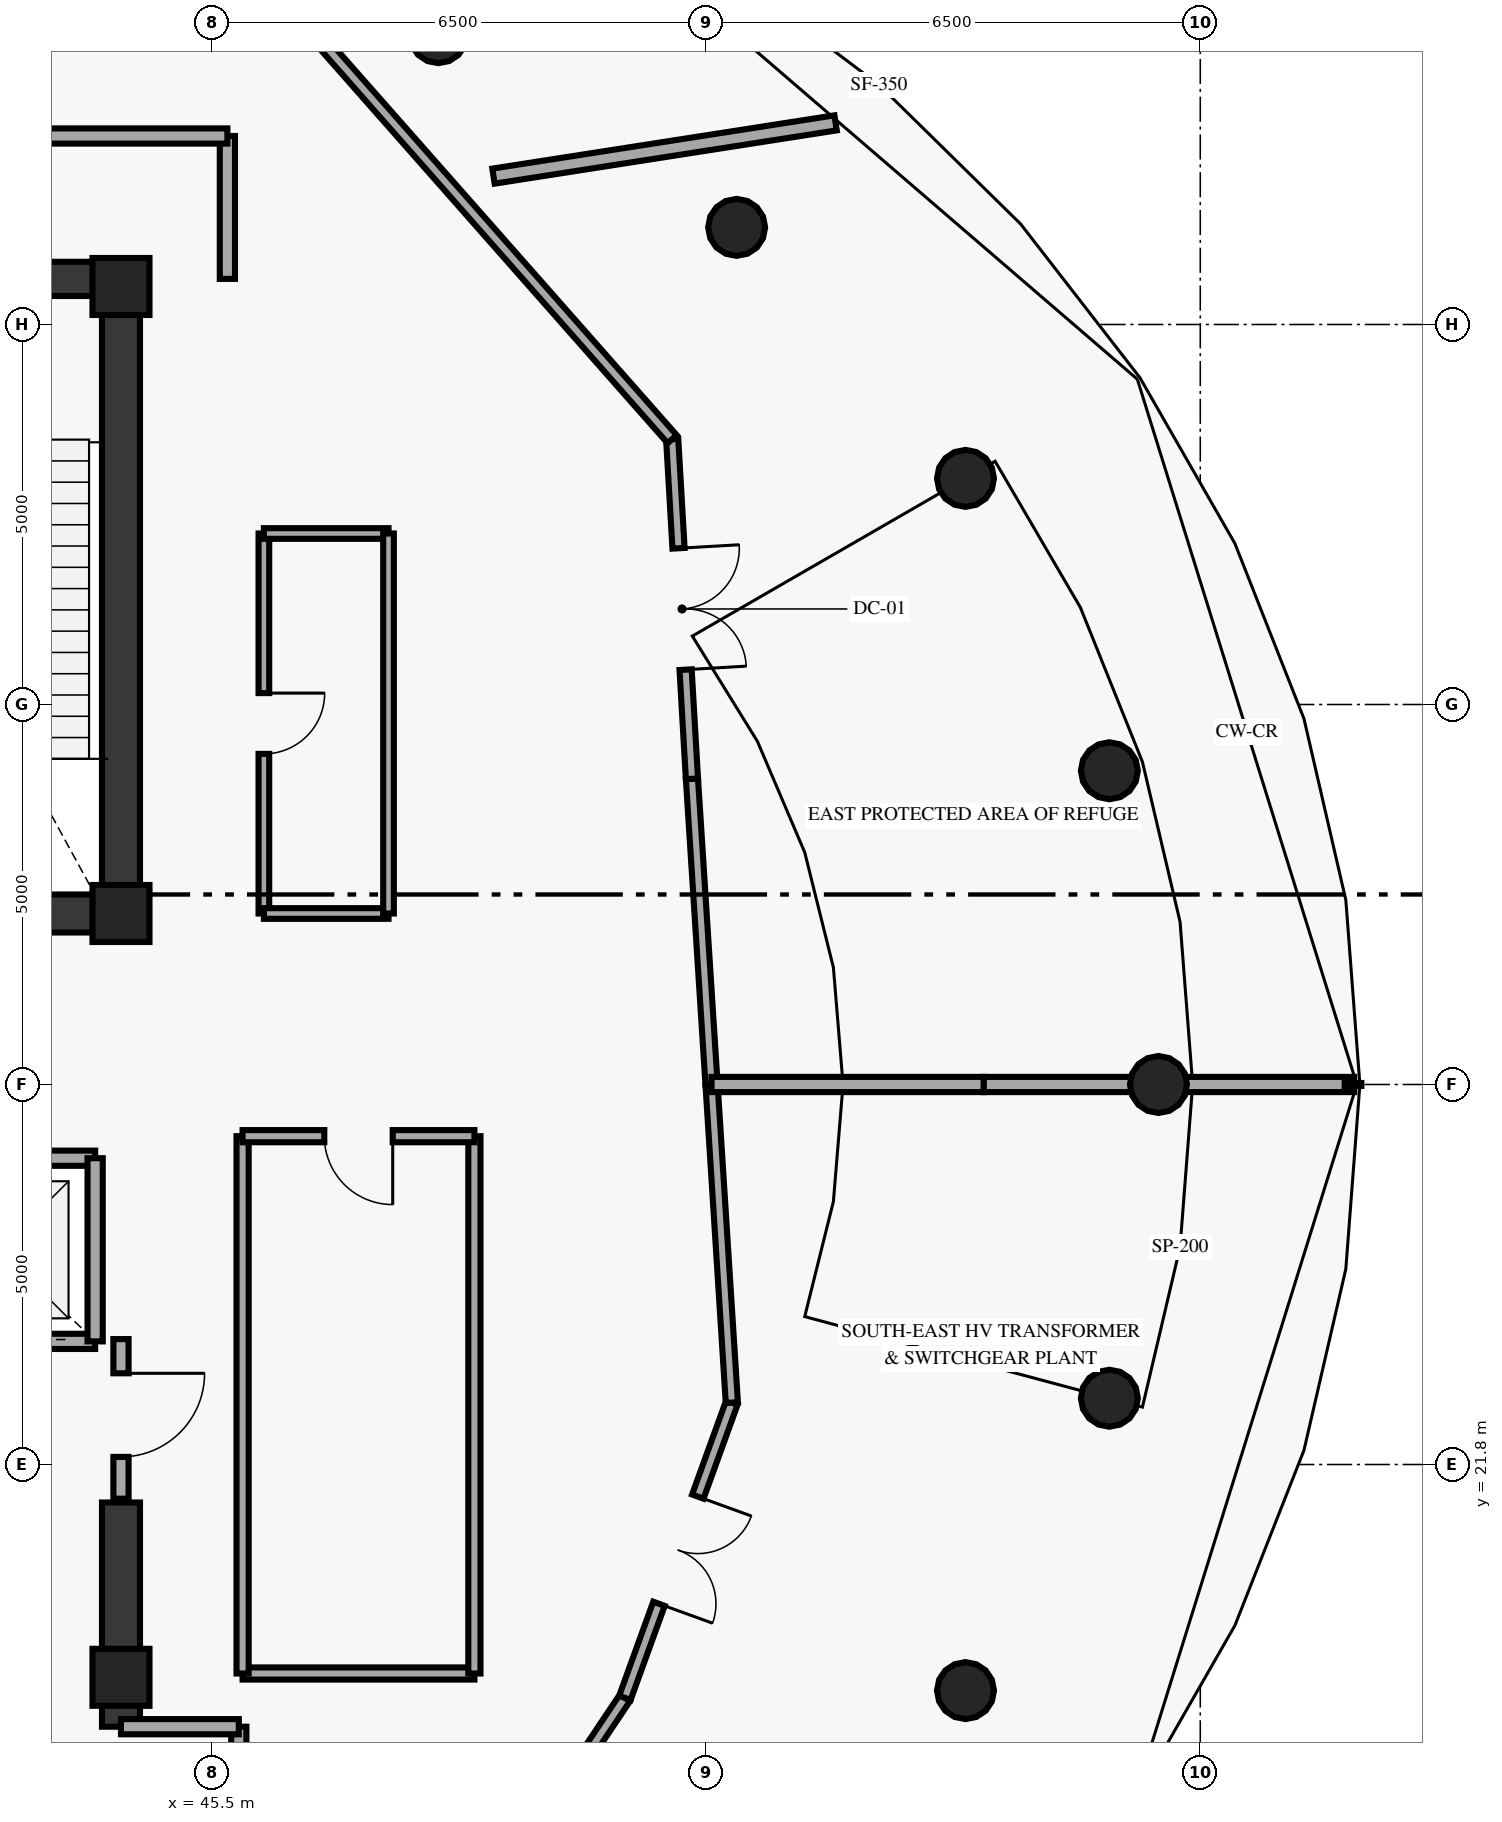
"""IFC4 building model, lengths in metres.
Left out: names, types, materials, properties, quantities, classifications, styles, units other than length and angle.
Written with IfcOpenShell. Run it as: python <this file> out.ifc"""

import sys

from ifc_helpers import new_model, si_unit, direction, frame, frame_2d, origin, origin_2d, place, context, subcontext, project, spatial, rectangle, circle, extrude, element, fill, save


model = new_model("IFC4")
c1 = context("Model", 3, precision=1e-05, world=origin(), true_north=direction((0.0, 1.0)))
c2 = subcontext(c1, "Body", "Model", "MODEL_VIEW")
j1 = project(units=[si_unit("LENGTHUNIT", "METRE"), si_unit("PLANEANGLEUNIT", "RADIAN")], contexts=[c1])
p1 = place(None, origin())
s1 = spatial("IfcSite", under=j1, at=p1, CompositionType="ELEMENT")
p2 = place(p1, origin())
s2 = spatial("IfcBuilding", under=s1, at=p2, CompositionType="ELEMENT")
p3 = place(p2, frame((0.0, 0.0, 301.2)))
s3 = spatial("IfcBuildingStorey", under=s2, at=p3, CompositionType="ELEMENT", Elevation=301.2)
for number, where, z_axis, x_axis in (
    (1, (44.3, 19.0, 0.0), (0.0, 0.0, 1.0), (1.0, 0.0, 0.0)),
    (2, (44.3, 29.05, 0.0), (0.0, 0.0, 1.0), (1.0, 0.0, 0.0)),
    (3, (44.3, 37.3, 0.0), (0.0, 0.0, 1.0), (1.0, 0.0, 0.0)),
):
    element("IfcColumn", number, at=place(p3, frame(where, z_axis=z_axis, x_axis=x_axis)), inside=s3, PredefinedType="PILASTER", context=c2, shape_type="SweptSolid", body=[
        extrude(rectangle(XDim=0.75, YDim=0.75, at=origin_2d()), origin(), (0.0, 0.0, 1.0), 5.25),
    ])
for number, where, z_axis, x_axis in (
    (4, (57.95, 26.8, 0.0), (0.0, 0.0, 1.0), (1.0, 0.0, 0.0)),
    (5, (57.304, 30.928, 0.0), (0.0, 0.0, 1.0), (1.0, 0.0, 0.0)),
    (6, (55.411, 34.775, 0.0), (0.0, 0.0, 1.0), (1.0, 0.0, 0.0)),
    (7, (52.4, 38.078, 0.0), (0.0, 0.0, 1.0), (1.0, 0.0, 0.0)),
    (8, (48.475, 40.613, 0.0), (0.0, 0.0, 1.0), (1.0, 0.0, 0.0)),
    (9, (55.411, 18.825, 0.0), (0.0, 0.0, 1.0), (1.0, 0.0, 0.0)),
    (10, (57.304, 22.672, 0.0), (0.0, 0.0, 1.0), (1.0, 0.0, 0.0)),
):
    element("IfcColumn", number, at=place(p3, frame(where, z_axis=z_axis, x_axis=x_axis)), inside=s3, PredefinedType="COLUMN", context=c2, shape_type="SweptSolid", body=[
        extrude(circle(Radius=0.375, at=origin_2d()), origin(), (0.0, 0.0, 1.0), 5.25),
    ])
p4 = place(p3, frame((44.3, 29.05, 0.0), z_axis=(0.0, 0.0, 1.0), x_axis=(0.0, 1.0, 0.0)))
e11 = element("IfcWall", 11, at=p4, inside=s3, PredefinedType="SHEAR", context=c2, shape_type="SweptSolid", body=[
    extrude(rectangle(XDim=8.35, YDim=0.5, at=frame_2d((4.175, 0.0))), origin(), (0.0, 0.0, 1.0), 5.25),
])
p5 = place(p3, frame((44.3, 18.35, 0.0), z_axis=(0.0, 0.0, 1.0), x_axis=(0.0, 1.0, 0.0)))
e12 = element("IfcWall", 12, at=p5, inside=s3, PredefinedType="SHEAR", context=c2, shape_type="SweptSolid", body=[
    extrude(rectangle(XDim=2.95, YDim=0.5, at=frame_2d((1.475, 0.0))), origin(), (0.0, 0.0, 1.0), 5.25),
])
p6 = place(p3, frame((33.7, 29.05, 0.0), z_axis=(0.0, 0.0, 1.0), x_axis=(1.0, 0.0, 0.0)))
e13 = element("IfcWall", 13, at=p6, inside=s3, PredefinedType="SHEAR", context=c2, shape_type="SweptSolid", body=[
    extrude(rectangle(XDim=10.6, YDim=0.5, at=frame_2d((5.3, 0.0))), origin(), (0.0, 0.0, 1.0), 5.25),
])
p7 = place(p3, frame((44.3, 37.4, 0.0), z_axis=(0.0, 0.0, 1.0), x_axis=(-1.0, 0.0, 0.0)))
e14 = element("IfcWall", 14, at=p7, inside=s3, PredefinedType="SHEAR", context=c2, shape_type="SweptSolid", body=[
    extrude(rectangle(XDim=3.65, YDim=0.45, at=frame_2d((1.825, 0.0))), origin(), (0.0, 0.0, 1.0), 5.25),
])
p8 = place(p7, frame((1.25, 0.0, 0.0)))
e15 = element("IfcOpeningElement", 15, at=p8, cuts=e14, PredefinedType="OPENING", context=c2, shape_type="SweptSolid", body=[
    extrude(rectangle(XDim=1.15, YDim=2.15, at=frame_2d((0.575, 1.075))), frame((0.0, 0.235, 0.0), z_axis=(0.0, -1.0, 0.0), x_axis=(1.0, 0.0, 0.0)), (0.0, 0.0, 1.0), 0.47),
])
p9 = place(p3, frame((45.7, 37.4, 0.0), z_axis=(0.0, 0.0, 1.0), x_axis=(0.0, 1.0, 0.0)))
e16 = element("IfcWall", 16, at=p9, inside=s3, PredefinedType="SOLIDWALL", context=c2, shape_type="SweptSolid", body=[
    extrude(rectangle(XDim=1.88, YDim=0.2, at=frame_2d((0.94, 0.0))), origin(), (0.0, 0.0, 1.0), 5.25),
])
p10 = place(p3, frame((45.7, 39.28, 0.0), z_axis=(0.0, 0.0, 1.0), x_axis=(-1.0, 0.0, 0.0)))
e17 = element("IfcWall", 17, at=p10, inside=s3, PredefinedType="SOLIDWALL", context=c2, shape_type="SweptSolid", body=[
    extrude(rectangle(XDim=6.6, YDim=0.2, at=frame_2d((3.3, 0.0))), origin(), (0.0, 0.0, 1.0), 5.25),
])
p11 = place(p10, frame((4.35, 0.0, 0.0)))
e18 = element("IfcOpeningElement", 18, at=p11, cuts=e17, PredefinedType="OPENING", context=c2, shape_type="SweptSolid", body=[
    extrude(rectangle(XDim=1.6, YDim=2.2, at=frame_2d((0.8, 1.1))), frame((0.0, 0.11, 0.0), z_axis=(0.0, -1.0, 0.0), x_axis=(1.0, 0.0, 0.0)), (0.0, 0.0, 1.0), 0.22),
])
p12 = place(p3, frame((41.46, 23.42, 0.0), z_axis=(0.0, 0.0, 1.0), x_axis=(1.0, 0.0, 0.0)))
e19 = element("IfcWall", 19, at=p12, inside=s3, PredefinedType="SOLIDWALL", context=c2, shape_type="SweptSolid", body=[
    extrude(rectangle(XDim=2.5, YDim=0.2, at=frame_2d((1.25, 0.0))), origin(), (0.0, 0.0, 1.0), 5.25),
])
p13 = place(p12, frame((0.7, 0.0, 0.0)))
e20 = element("IfcOpeningElement", 20, at=p13, cuts=e19, PredefinedType="OPENING", context=c2, shape_type="SweptSolid", body=[
    extrude(rectangle(XDim=1.1, YDim=2.15, at=frame_2d((0.55, 1.075))), frame((0.0, 0.11, 0.0), z_axis=(0.0, -1.0, 0.0), x_axis=(1.0, 0.0, 0.0)), (0.0, 0.0, 1.0), 0.22),
])
p14 = place(p3, frame((41.46, 25.83, 0.0), z_axis=(0.0, 0.0, 1.0), x_axis=(1.0, 0.0, 0.0)))
e21 = element("IfcWall", 21, at=p14, inside=s3, PredefinedType="SOLIDWALL", context=c2, shape_type="SweptSolid", body=[
    extrude(rectangle(XDim=2.5, YDim=0.2, at=frame_2d((1.25, 0.0))), origin(), (0.0, 0.0, 1.0), 5.25),
])
p15 = place(p3, frame((43.96, 23.42, 0.0), z_axis=(0.0, 0.0, 1.0), x_axis=(0.0, 1.0, 0.0)))
e22 = element("IfcWall", 22, at=p15, inside=s3, PredefinedType="SOLIDWALL", context=c2, shape_type="SweptSolid", body=[
    extrude(rectangle(XDim=2.41, YDim=0.2, at=frame_2d((1.205, 0.0))), origin(), (0.0, 0.0, 1.0), 5.25),
])
p16 = place(p3, frame((45.9, 19.05, 0.0), z_axis=(0.0, 0.0, 1.0), x_axis=(1.0, 0.0, 0.0)))
e23 = element("IfcWall", 23, at=p16, inside=s3, PredefinedType="PARTITIONING", context=c2, shape_type="SweptSolid", body=[
    extrude(rectangle(XDim=3.05, YDim=0.16, at=frame_2d((1.525, 0.0))), origin(), (0.0, 0.0, 1.0), 5.25),
])
for number, where, z_axis, x_axis in (
    (24, (48.95, 19.05, 0.0), (0.0, 0.0, 1.0), (0.0, 1.0, 0.0)),
    (25, (45.9, 19.05, 0.0), (0.0, 0.0, 1.0), (0.0, 1.0, 0.0)),
):
    element("IfcWall", number, at=place(p3, frame(where, z_axis=z_axis, x_axis=x_axis)), inside=s3, PredefinedType="PARTITIONING", context=c2, shape_type="SweptSolid", body=[
        extrude(rectangle(XDim=7.07, YDim=0.16, at=frame_2d((3.535, 0.0))), origin(), (0.0, 0.0, 1.0), 5.25),
    ])
p17 = place(p3, frame((48.95, 26.12, 0.0), z_axis=(0.0, 0.0, 1.0), x_axis=(-1.0, 0.0, 0.0)))
e26 = element("IfcWall", 26, at=p17, inside=s3, PredefinedType="PARTITIONING", context=c2, shape_type="SweptSolid", body=[
    extrude(rectangle(XDim=3.05, YDim=0.16, at=frame_2d((1.525, 0.0))), origin(), (0.0, 0.0, 1.0), 5.25),
])
p18 = place(p17, frame((1.075, 0.0, 0.0)))
e27 = element("IfcOpeningElement", 27, at=p18, cuts=e26, PredefinedType="OPENING", context=c2, shape_type="SweptSolid", body=[
    extrude(rectangle(XDim=0.9, YDim=2.1, at=frame_2d((0.45, 1.05))), frame((0.0, 0.09, 0.0), z_axis=(0.0, -1.0, 0.0), x_axis=(1.0, 0.0, 0.0)), (0.0, 0.0, 1.0), 0.18),
])
p19 = place(p3, frame((44.3, 21.35, 0.0), z_axis=(0.0, 0.0, 1.0), x_axis=(0.0, 1.0, 0.0)))
e28 = element("IfcWall", 28, at=p19, inside=s3, PredefinedType="SOLIDWALL", context=c2, shape_type="SweptSolid", body=[
    extrude(rectangle(XDim=2.1, YDim=0.2, at=frame_2d((1.05, 0.0))), origin(), (0.0, 0.0, 1.0), 4.635),
])
p20 = place(p19, frame((0.55, 0.0, 0.0)))
e29 = element("IfcOpeningElement", 29, at=p20, cuts=e28, PredefinedType="OPENING", context=c2, shape_type="SweptSolid", body=[
    extrude(rectangle(XDim=1.1, YDim=2.15, at=frame_2d((0.55, 1.075))), frame((0.0, 0.11, 0.0), z_axis=(0.0, -1.0, 0.0), x_axis=(1.0, 0.0, 0.0)), (0.0, 0.0, 1.0), 0.22),
])
p21 = place(p3, frame((45.85, 16.05, 0.0), z_axis=(0.0, 0.0, 1.0), x_axis=(0.0, 1.0, 0.0)))
e30 = element("IfcWall", 30, at=p21, inside=s3, PredefinedType="SOLIDWALL", context=c2, shape_type="SweptSolid", body=[
    extrude(rectangle(XDim=2.3, YDim=0.2, at=frame_2d((1.15, 0.0))), origin(), (0.0, 0.0, 1.0), 5.25),
])
p22 = place(p3, frame((44.3, 18.35, 0.0), z_axis=(0.0, 0.0, 1.0), x_axis=(1.0, 0.0, 0.0)))
e31 = element("IfcWall", 31, at=p22, inside=s3, PredefinedType="SOLIDWALL", context=c2, shape_type="SweptSolid", body=[
    extrude(rectangle(XDim=1.55, YDim=0.2, at=frame_2d((0.775, 0.0))), origin(), (0.0, 0.0, 1.0), 5.25),
])
p23 = place(p3, frame((46.18, 34.05, 0.0), z_axis=(0.0, 0.0, 1.0), x_axis=(0.0, -1.0, 0.0)))
e32 = element("IfcWall", 32, at=p23, inside=s3, PredefinedType="PARTITIONING", context=c2, shape_type="SweptSolid", body=[
    extrude(rectangle(XDim=5.0, YDim=0.14, at=frame_2d((2.5, 0.0))), origin(), (0.0, 0.0, 1.0), 5.25),
])
p24 = place(p23, frame((2.1, 0.0, 0.0)))
e33 = element("IfcOpeningElement", 33, at=p24, cuts=e32, PredefinedType="OPENING", context=c2, shape_type="SweptSolid", body=[
    extrude(rectangle(XDim=0.8, YDim=2.05, at=frame_2d((0.4, 1.025))), frame((0.0, 0.08, 0.0), z_axis=(0.0, -1.0, 0.0), x_axis=(1.0, 0.0, 0.0)), (0.0, 0.0, 1.0), 0.16),
])
for number, where, z_axis, x_axis in (
    (34, (46.18, 29.05, 0.0), (0.0, 0.0, 1.0), (1.0, 0.0, 0.0)),
    (35, (46.18, 34.05, 0.0), (0.0, 0.0, 1.0), (1.0, 0.0, 0.0)),
):
    element("IfcWall", number, at=place(p3, frame(where, z_axis=z_axis, x_axis=x_axis)), inside=s3, PredefinedType="PARTITIONING", context=c2, shape_type="SweptSolid", body=[
        extrude(rectangle(XDim=1.64, YDim=0.14, at=frame_2d((0.82, 0.0))), origin(), (0.0, 0.0, 1.0), 5.25),
    ])
p25 = place(p3, frame((47.82, 29.05, 0.0), z_axis=(0.0, 0.0, 1.0), x_axis=(0.0, 1.0, 0.0)))
e36 = element("IfcWall", 36, at=p25, inside=s3, PredefinedType="PARTITIONING", context=c2, shape_type="SweptSolid", body=[
    extrude(rectangle(XDim=5.0, YDim=0.14, at=frame_2d((2.5, 0.0))), origin(), (0.0, 0.0, 1.0), 5.25),
])
p26 = place(p3, frame((52.07, 26.8, 0.0), z_axis=(0.0, 0.0, 1.0), x_axis=(-0.064030047677, 0.997947971086, 0.0)))
e37 = element("IfcWall", 37, at=p26, inside=s3, PredefinedType="PARTITIONING", context=c2, shape_type="SweptSolid", body=[
    extrude(rectangle(XDim=4.03, YDim=0.16, at=frame_2d((2.015, 0.0))), origin(), (0.0, 0.0, 1.0), 5.25),
])
p27 = place(p3, frame((51.552, 35.291, 0.0), z_axis=(0.0, 0.0, 1.0), x_axis=(0.058082602913, -0.998311780577, 0.0)))
e38 = element("IfcWall", 38, at=p27, inside=s3, PredefinedType="PARTITIONING", context=c2, shape_type="SweptSolid", body=[
    extrude(rectangle(XDim=4.477, YDim=0.16, at=frame_2d((2.238, 0.0))), origin(), (0.0, 0.0, 1.0), 5.25),
])
p28 = place(p27, frame((1.438, 0.0, 0.0)))
e39 = element("IfcOpeningElement", 39, at=p28, cuts=e38, PredefinedType="OPENING", context=c2, shape_type="SweptSolid", body=[
    extrude(rectangle(XDim=1.6, YDim=2.2, at=frame_2d((0.8, 1.1))), frame((0.0, 0.09, 0.0), z_axis=(0.0, -1.0, 0.0), x_axis=(1.0, 0.0, 0.0)), (0.0, 0.0, 1.0), 0.18),
])
p29 = place(p3, frame((51.552, 35.291, 0.0), z_axis=(0.0, 0.0, 1.0), x_axis=(-0.661421630005, 0.750014284772, 0.0)))
e40 = element("IfcWall", 40, at=p29, inside=s3, PredefinedType="PARTITIONING", context=c2, shape_type="SweptSolid", body=[
    extrude(rectangle(XDim=8.116, YDim=0.16, at=frame_2d((4.058, 0.0))), origin(), (0.0, 0.0, 1.0), 5.25),
])
p30 = place(p3, frame((48.714, 15.418, 0.0), z_axis=(0.0, 0.0, 1.0), x_axis=(0.556056751682, 0.831144324958, 0.0)))
e41 = element("IfcWall", 41, at=p30, inside=s3, PredefinedType="PARTITIONING", context=c2, shape_type="SweptSolid", body=[
    extrude(rectangle(XDim=3.985, YDim=0.16, at=frame_2d((1.992, 0.0))), origin(), (0.0, 0.0, 1.0), 5.25),
])
p31 = place(p3, frame((52.337, 22.614, 0.0), z_axis=(0.0, 0.0, 1.0), x_axis=(-0.34058972089, -0.940212019719, 0.0)))
e42 = element("IfcWall", 42, at=p31, inside=s3, PredefinedType="PARTITIONING", context=c2, shape_type="SweptSolid", body=[
    extrude(rectangle(XDim=4.131, YDim=0.16, at=frame_2d((2.065, 0.0))), origin(), (0.0, 0.0, 1.0), 5.25),
])
p32 = place(p31, frame((1.315, 0.0, 0.0)))
e43 = element("IfcOpeningElement", 43, at=p32, cuts=e42, PredefinedType="OPENING", context=c2, shape_type="SweptSolid", body=[
    extrude(rectangle(XDim=1.5, YDim=2.2, at=frame_2d((0.75, 1.1))), frame((0.0, 0.09, 0.0), z_axis=(0.0, -1.0, 0.0), x_axis=(1.0, 0.0, 0.0)), (0.0, 0.0, 1.0), 0.18),
])
p33 = place(p3, frame((52.337, 22.614, 0.0), z_axis=(0.0, 0.0, 1.0), x_axis=(-0.063617518313, 0.997974354061, 0.0)))
e44 = element("IfcWall", 44, at=p33, inside=s3, PredefinedType="PARTITIONING", context=c2, shape_type="SweptSolid", body=[
    extrude(rectangle(XDim=4.195, YDim=0.16, at=frame_2d((2.097, 0.0))), origin(), (0.0, 0.0, 1.0), 5.25),
])
p34 = place(p3, frame((52.07, 26.8, 0.0), z_axis=(0.0, 0.0, 1.0), x_axis=(1.0, 0.0, 0.0)))
e45 = element("IfcWall", 45, at=p34, inside=s3, PredefinedType="SOLIDWALL", context=c2, shape_type="SweptSolid", body=[
    extrude(rectangle(XDim=3.582, YDim=0.2, at=frame_2d((1.791, 0.0))), origin(), (0.0, 0.0, 1.0), 5.25),
])
p35 = place(p3, frame((55.652, 26.8, 0.0), z_axis=(0.0, 0.0, 1.0), x_axis=(1.0, 0.0, 0.0)))
e46 = element("IfcWall", 46, at=p35, inside=s3, PredefinedType="SOLIDWALL", context=c2, shape_type="SweptSolid", body=[
    extrude(rectangle(XDim=2.314, YDim=0.2, at=frame_2d((1.157, 0.0))), origin(), (0.0, 0.0, 1.0), 3.45),
])
p36 = place(p3, frame((57.966, 26.8, 0.0), z_axis=(0.0, 0.0, 1.0), x_axis=(1.0, 0.0, 0.0)))
e47 = element("IfcWall", 47, at=p36, inside=s3, PredefinedType="SOLIDWALL", context=c2, shape_type="SweptSolid", body=[
    extrude(rectangle(XDim=2.559, YDim=0.2, at=frame_2d((1.279, 0.0))), origin(), (0.0, 0.0, 1.0), 5.25),
])
p37 = place(p3, frame((49.201, 38.752, 0.0), z_axis=(0.0, 0.0, 1.0), x_axis=(0.988090587407, 0.153873295533, 0.0)))
e48 = element("IfcWall", 48, at=p37, inside=s3, PredefinedType="SOLIDWALL", context=c2, shape_type="SweptSolid", body=[
    extrude(rectangle(XDim=4.555, YDim=0.2, at=frame_2d((2.278, 0.0))), origin(), (0.0, 0.0, 1.0), 5.25),
])
p38 = place(p18, origin())
e49 = element("IfcDoor", 49, at=p38, inside=s3, OperationType="SINGLE_SWING_LEFT", PredefinedType="DOOR", context=c2, shape_type="SweptSolid", body=[
    extrude(rectangle(XDim=0.9, YDim=2.1, at=frame_2d((0.45, 1.05))), frame((0.0, 0.025, 0.0), z_axis=(0.0, -1.0, 0.0), x_axis=(1.0, 0.0, 0.0)), (0.0, 0.0, 1.0), 0.05),
])
fill(e27, e49)
p39 = place(p20, origin())
e50 = element("IfcDoor", 50, at=p39, inside=s3, OperationType="SINGLE_SWING_RIGHT", PredefinedType="DOOR", context=c2, shape_type="SweptSolid", body=[
    extrude(rectangle(XDim=1.1, YDim=2.15, at=frame_2d((0.55, 1.075))), frame((0.0, 0.025, 0.0), z_axis=(0.0, -1.0, 0.0), x_axis=(1.0, 0.0, 0.0)), (0.0, 0.0, 1.0), 0.05),
])
fill(e29, e50)
p40 = place(p24, origin())
e51 = element("IfcDoor", 51, at=p40, inside=s3, OperationType="SINGLE_SWING_LEFT", PredefinedType="DOOR", context=c2, shape_type="SweptSolid", body=[
    extrude(rectangle(XDim=0.8, YDim=2.05, at=frame_2d((0.4, 1.025))), frame((0.0, 0.025, 0.0), z_axis=(0.0, -1.0, 0.0), x_axis=(1.0, 0.0, 0.0)), (0.0, 0.0, 1.0), 0.05),
])
fill(e33, e51)
p41 = place(p28, origin())
e52 = element("IfcDoor", 52, at=p41, inside=s3, OperationType="DOUBLE_DOOR_SINGLE_SWING", PredefinedType="DOOR", context=c2, shape_type="SweptSolid", body=[
    extrude(rectangle(XDim=1.6, YDim=2.2, at=frame_2d((0.8, 1.1))), frame((0.0, 0.025, 0.0), z_axis=(0.0, -1.0, 0.0), x_axis=(1.0, 0.0, 0.0)), (0.0, 0.0, 1.0), 0.05),
])
fill(e39, e52)
p42 = place(p32, origin())
e53 = element("IfcDoor", 53, at=p42, inside=s3, OperationType="DOUBLE_DOOR_SINGLE_SWING", PredefinedType="DOOR", context=c2, shape_type="SweptSolid", body=[
    extrude(rectangle(XDim=1.5, YDim=2.2, at=frame_2d((0.75, 1.1))), frame((0.0, 0.025, 0.0), z_axis=(0.0, -1.0, 0.0), x_axis=(1.0, 0.0, 0.0)), (0.0, 0.0, 1.0), 0.05),
])
fill(e43, e53)
save(model, sys.argv[1])
